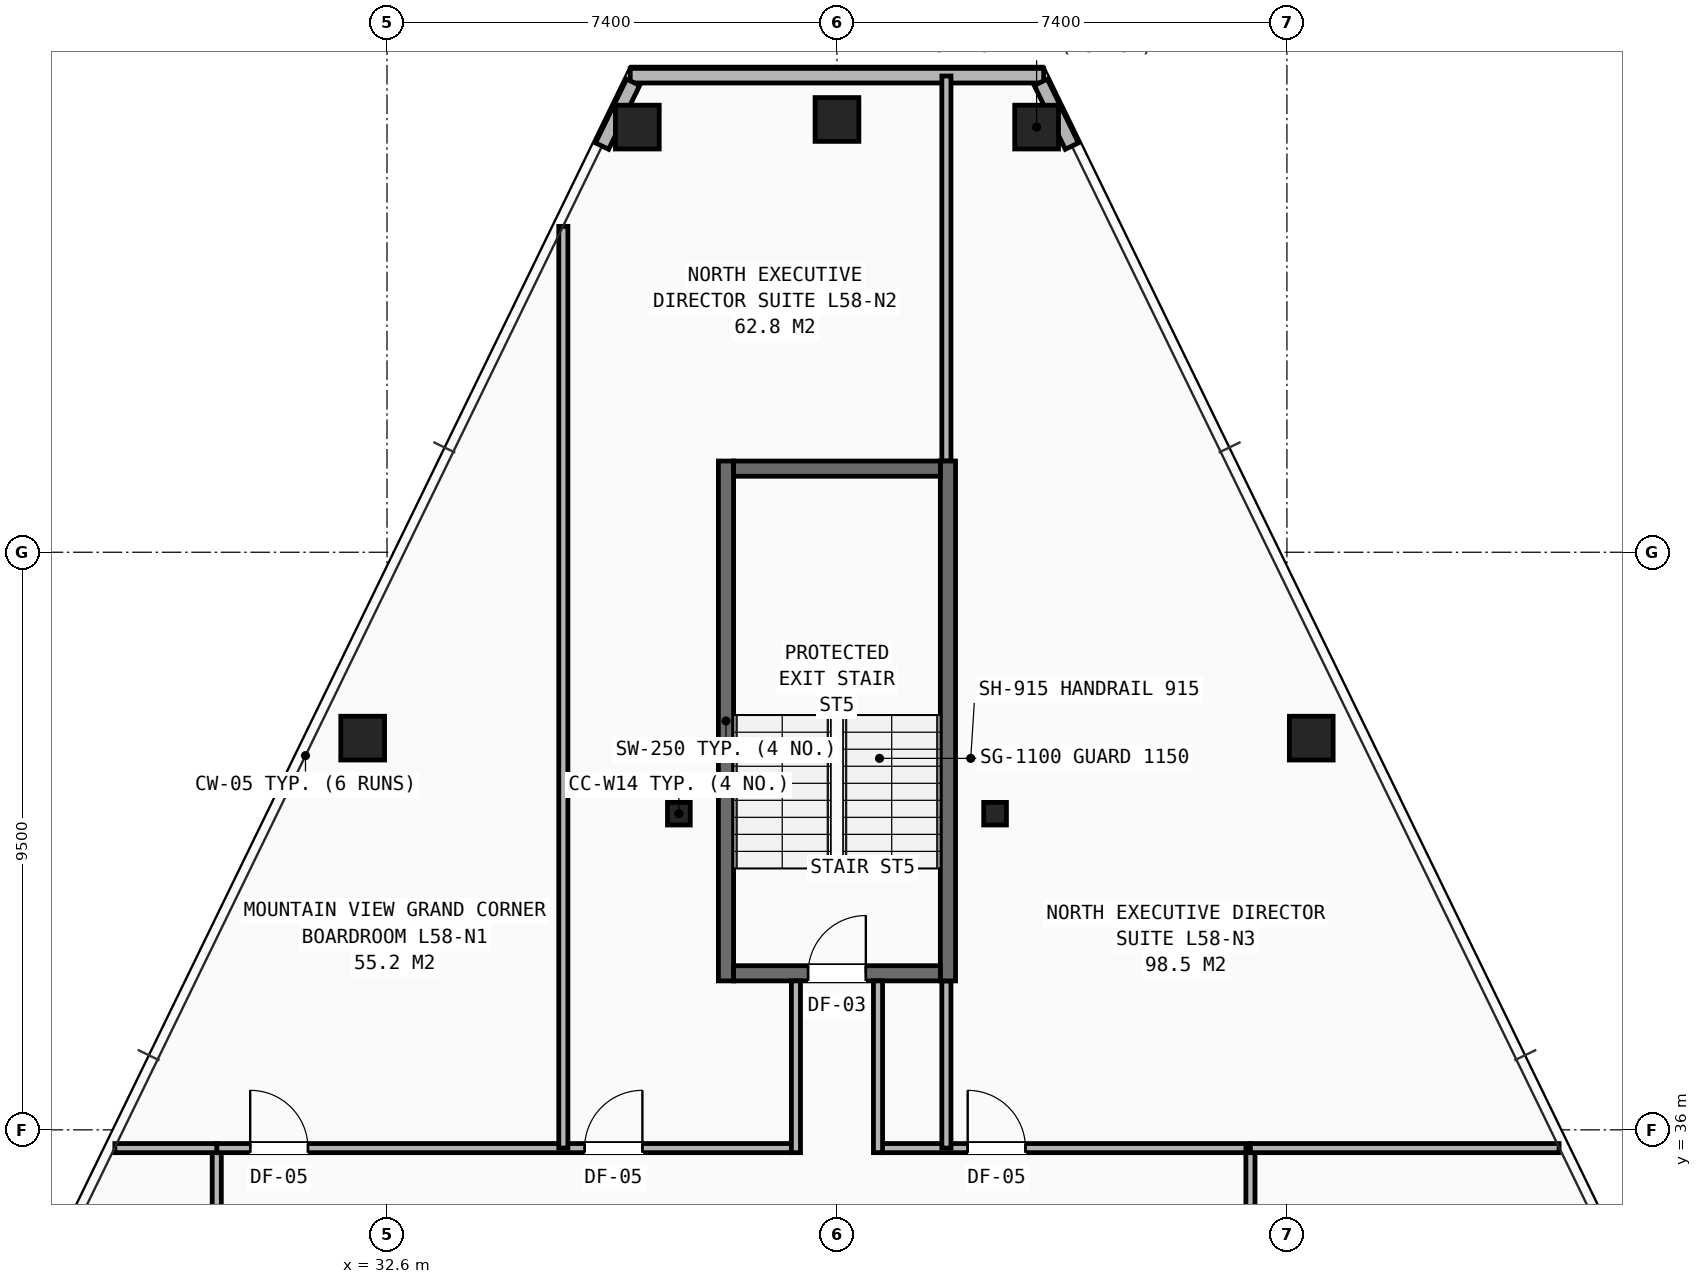
"""IFC4 building model, lengths in metres.
Left out: names, types, materials, properties, quantities, classifications, styles, units other than length and angle.
Written with IfcOpenShell. Run it as: python <this file> out.ifc"""

import sys

from ifc_helpers import new_model, si_unit, direction, frame, frame_2d, origin, origin_2d, place, context, subcontext, project, spatial, rectangle, hollow_rectangle, i_section, extrude, element, fill, save


model = new_model("IFC4")
c1 = context("Model", 3, precision=1e-05, world=origin(), true_north=direction((0.0, 1.0)))
c2 = subcontext(c1, "Body", "Model", "MODEL_VIEW")
j1 = project(units=[si_unit("LENGTHUNIT", "METRE"), si_unit("PLANEANGLEUNIT", "RADIAN")], contexts=[c1])
p1 = place(None, origin())
s1 = spatial("IfcSite", under=j1, at=p1, CompositionType="ELEMENT")
p2 = place(p1, origin())
s2 = spatial("IfcBuilding", under=s1, at=p2, CompositionType="ELEMENT")
p3 = place(p2, frame((0.0, 0.0, 204.9)))
s3 = spatial("IfcBuildingStorey", under=s2, at=p3, CompositionType="ELEMENT", Elevation=204.9)
for number, where, z_axis, x_axis in (
    (1, (37.4, 41.2, 0.0), (0.0, 0.0, 1.0), (1.0, 0.0, 0.0)),
    (2, (42.6, 41.2, 0.0), (0.0, 0.0, 1.0), (1.0, 0.0, 0.0)),
):
    element("IfcColumn", number, at=place(p3, frame(where, z_axis=z_axis, x_axis=x_axis)), inside=s3, PredefinedType="COLUMN", context=c2, shape_type="SweptSolid", body=[
        extrude(i_section(OverallWidth=0.374, OverallDepth=0.372, WebThickness=0.016, FlangeThickness=0.026, at=origin_2d()), origin(), (0.0, 0.0, 1.0), 3.5),
    ])
for number, where, z_axis, x_axis in (
    (3, (43.283, 52.492, 0.0), (0.0, 0.0, 1.0), (1.0, 0.0, 0.0)),
    (4, (40.0, 52.618, 0.0), (0.0, 0.0, 1.0), (1.0, 0.0, 0.0)),
    (5, (36.717, 52.492, 0.0), (0.0, 0.0, 1.0), (1.0, 0.0, 0.0)),
    (6, (32.2, 42.443, 0.0), (0.0, 0.0, 1.0), (1.0, 0.0, 0.0)),
    (7, (47.8, 42.443, 0.0), (0.0, 0.0, 1.0), (1.0, 0.0, 0.0)),
):
    element("IfcColumn", number, at=place(p3, frame(where, z_axis=z_axis, x_axis=x_axis)), inside=s3, PredefinedType="COLUMN", context=c2, shape_type="SweptSolid", body=[
        extrude(hollow_rectangle(XDim=0.72, YDim=0.72, WallThickness=0.05, at=origin_2d()), origin(), (0.0, 0.0, 1.0), 3.5),
    ])
p4 = place(p3, frame((36.6, 53.338, 0.0), z_axis=(0.0, 0.0, 1.0), x_axis=(1.0, 0.0, 0.0)))
e8 = element("IfcWall", 8, at=p4, inside=s3, PredefinedType="SHEAR", context=c2, shape_type="SweptSolid", body=[
    extrude(rectangle(XDim=6.8, YDim=0.24, at=frame_2d((3.4, 0.0))), origin(), (0.0, 0.0, 1.0), 2.623),
])
for number, where, z_axis, x_axis in (
    (9, (36.648, 53.23, 0.0), (0.0, 0.0, 1.0), (-0.438, -0.899, 0.0)),
    (10, (43.863, 52.18, 0.0), (0.0, 0.0, 1.0), (-0.438, 0.899, 0.0)),
):
    element("IfcWall", number, at=place(p3, frame(where, z_axis=z_axis, x_axis=x_axis)), inside=s3, PredefinedType="SHEAR", context=c2, shape_type="SweptSolid", body=[
        extrude(rectangle(XDim=1.168, YDim=0.24, at=frame_2d((0.584, 0.0))), origin(), (0.0, 0.0, 1.0), 2.623),
    ])
p5 = place(p3, frame((29.8, 16.4, 0.0), z_axis=(0.0, 0.0, 1.0), x_axis=(0.0, 1.0, 0.0)))
e11 = element("IfcWall", 11, at=p5, inside=s3, PredefinedType="PARTITIONING", context=c2, shape_type="SweptSolid", body=[
    extrude(rectangle(XDim=19.3, YDim=0.15, at=frame_2d((9.65, 0.0))), origin(), (0.0, 0.0, 1.0), 2.292),
])
p6 = place(p5, frame((0.35, 0.0, 0.0)))
e12 = element("IfcOpeningElement", 12, at=p6, cuts=e11, PredefinedType="OPENING", context=c2, shape_type="SweptSolid", body=[
    extrude(rectangle(XDim=0.95, YDim=2.1, at=frame_2d((0.475, 1.05))), frame((0.0, 0.085, 0.0), z_axis=(0.0, -1.0, 0.0), x_axis=(1.0, 0.0, 0.0)), (0.0, 0.0, 1.0), 0.17),
])
p7 = place(p5, frame((4.45, 0.0, 0.0)))
e13 = element("IfcOpeningElement", 13, at=p7, cuts=e11, PredefinedType="OPENING", context=c2, shape_type="SweptSolid", body=[
    extrude(rectangle(XDim=0.95, YDim=2.1, at=frame_2d((0.475, 1.05))), frame((0.0, 0.085, 0.0), z_axis=(0.0, -1.0, 0.0), x_axis=(1.0, 0.0, 0.0)), (0.0, 0.0, 1.0), 0.17),
])
p8 = place(p5, frame((9.45, 0.0, 0.0)))
e14 = element("IfcOpeningElement", 14, at=p8, cuts=e11, PredefinedType="OPENING", context=c2, shape_type="SweptSolid", body=[
    extrude(rectangle(XDim=0.95, YDim=2.1, at=frame_2d((0.475, 1.05))), frame((0.0, 0.085, 0.0), z_axis=(0.0, -1.0, 0.0), x_axis=(1.0, 0.0, 0.0)), (0.0, 0.0, 1.0), 0.17),
])
p9 = place(p5, frame((14.75, 0.0, 0.0)))
e15 = element("IfcOpeningElement", 15, at=p9, cuts=e11, PredefinedType="OPENING", context=c2, shape_type="SweptSolid", body=[
    extrude(rectangle(XDim=0.95, YDim=2.1, at=frame_2d((0.475, 1.05))), frame((0.0, 0.085, 0.0), z_axis=(0.0, -1.0, 0.0), x_axis=(1.0, 0.0, 0.0)), (0.0, 0.0, 1.0), 0.17),
])
p10 = place(p3, frame((29.8, 35.7, 0.0), z_axis=(0.0, 0.0, 1.0), x_axis=(1.0, 0.0, 0.0)))
e16 = element("IfcWall", 16, at=p10, inside=s3, PredefinedType="PARTITIONING", context=c2, shape_type="SweptSolid", body=[
    extrude(rectangle(XDim=9.45, YDim=0.15, at=frame_2d((4.725, 0.0))), origin(), (0.0, 0.0, 1.0), 2.833),
])
p11 = place(p10, frame((0.55, 0.0, 0.0)))
e17 = element("IfcOpeningElement", 17, at=p11, cuts=e16, PredefinedType="OPENING", context=c2, shape_type="SweptSolid", body=[
    extrude(rectangle(XDim=0.95, YDim=2.1, at=frame_2d((0.475, 1.05))), frame((0.0, 0.085, 0.0), z_axis=(0.0, -1.0, 0.0), x_axis=(1.0, 0.0, 0.0)), (0.0, 0.0, 1.0), 0.17),
])
p12 = place(p10, frame((6.05, 0.0, 0.0)))
e18 = element("IfcOpeningElement", 18, at=p12, cuts=e16, PredefinedType="OPENING", context=c2, shape_type="SweptSolid", body=[
    extrude(rectangle(XDim=0.95, YDim=2.1, at=frame_2d((0.475, 1.05))), frame((0.0, 0.085, 0.0), z_axis=(0.0, -1.0, 0.0), x_axis=(1.0, 0.0, 0.0)), (0.0, 0.0, 1.0), 0.17),
])
p13 = place(p3, frame((40.75, 35.7, 0.0), z_axis=(0.0, 0.0, 1.0), x_axis=(1.0, 0.0, 0.0)))
e19 = element("IfcWall", 19, at=p13, inside=s3, PredefinedType="PARTITIONING", context=c2, shape_type="SweptSolid", body=[
    extrude(rectangle(XDim=6.05, YDim=0.15, at=frame_2d((3.025, 0.0))), origin(), (0.0, 0.0, 1.0), 3.25),
])
p14 = place(p13, frame((1.4, 0.0, 0.0)))
e20 = element("IfcOpeningElement", 20, at=p14, cuts=e19, PredefinedType="OPENING", context=c2, shape_type="SweptSolid", body=[
    extrude(rectangle(XDim=0.95, YDim=2.1, at=frame_2d((0.475, 1.05))), frame((0.0, 0.085, 0.0), z_axis=(0.0, -1.0, 0.0), x_axis=(1.0, 0.0, 0.0)), (0.0, 0.0, 1.0), 0.17),
])
p15 = place(p3, frame((46.8, 31.2, 0.0), z_axis=(0.0, 0.0, 1.0), x_axis=(0.0, 1.0, 0.0)))
e21 = element("IfcWall", 21, at=p15, inside=s3, PredefinedType="PARTITIONING", context=c2, shape_type="SweptSolid", body=[
    extrude(rectangle(XDim=4.5, YDim=0.15, at=frame_2d((2.25, 0.0))), origin(), (0.0, 0.0, 1.0), 2.705),
])
p16 = place(p3, frame((28.124, 35.7, 0.0), z_axis=(0.0, 0.0, 1.0), x_axis=(1.0, 0.0, 0.0)))
e22 = element("IfcWall", 22, at=p16, inside=s3, PredefinedType="PARTITIONING", context=c2, shape_type="SweptSolid", body=[
    extrude(rectangle(XDim=1.676, YDim=0.15, at=frame_2d((0.838, 0.0))), origin(), (0.0, 0.0, 1.0), 2.628),
])
p17 = place(p3, frame((46.8, 35.7, 0.0), z_axis=(0.0, 0.0, 1.0), x_axis=(1.0, 0.0, 0.0)))
e23 = element("IfcWall", 23, at=p17, inside=s3, PredefinedType="PARTITIONING", context=c2, shape_type="SweptSolid", body=[
    extrude(rectangle(XDim=5.076, YDim=0.15, at=frame_2d((2.538, 0.0))), origin(), (0.0, 0.0, 1.0), 2.628),
])
p18 = place(p3, frame((35.5, 35.7, 0.0), z_axis=(0.0, 0.0, 1.0), x_axis=(0.0, 1.0, 0.0)))
e24 = element("IfcWall", 24, at=p18, inside=s3, PredefinedType="PARTITIONING", context=c2, shape_type="SweptSolid", body=[
    extrude(rectangle(XDim=15.16, YDim=0.15, at=frame_2d((7.58, 0.0))), origin(), (0.0, 0.0, 1.0), 2.292),
])
p19 = place(p3, frame((41.8, 35.7, 0.0), z_axis=(0.0, 0.0, 1.0), x_axis=(0.0, 1.0, 0.0)))
e25 = element("IfcWall", 25, at=p19, inside=s3, PredefinedType="PARTITIONING", context=c2, shape_type="SweptSolid", body=[
    extrude(rectangle(XDim=2.75, YDim=0.15, at=frame_2d((1.375, 0.0))), origin(), (0.0, 0.0, 1.0), 3.25),
])
p20 = place(p3, frame((41.8, 47.0, 0.0), z_axis=(0.0, 0.0, 1.0), x_axis=(0.0, 1.0, 0.0)))
e26 = element("IfcWall", 26, at=p20, inside=s3, PredefinedType="PARTITIONING", context=c2, shape_type="SweptSolid", body=[
    extrude(rectangle(XDim=6.333, YDim=0.15, at=frame_2d((3.167, 0.0))), origin(), (0.0, 0.0, 1.0), 2.628),
])
for number, where, z_axis, x_axis in (
    (27, (38.175, 38.45, 0.0), (0.0, 0.0, 1.0), (0.0, 1.0, 0.0)),
    (28, (41.825, 38.45, 0.0), (0.0, 0.0, 1.0), (0.0, 1.0, 0.0)),
):
    element("IfcWall", number, at=place(p3, frame(where, z_axis=z_axis, x_axis=x_axis)), inside=s3, PredefinedType="SHEAR", context=c2, shape_type="SweptSolid", body=[
        extrude(rectangle(XDim=8.55, YDim=0.25, at=frame_2d((4.275, 0.0))), origin(), (0.0, 0.0, 1.0), 3.25),
    ])
p21 = place(p3, frame((38.3, 38.575, 0.0), z_axis=(0.0, 0.0, 1.0), x_axis=(1.0, 0.0, 0.0)))
e29 = element("IfcWall", 29, at=p21, inside=s3, PredefinedType="SHEAR", context=c2, shape_type="SweptSolid", body=[
    extrude(rectangle(XDim=3.4, YDim=0.25, at=frame_2d((1.7, 0.0))), origin(), (0.0, 0.0, 1.0), 3.25),
])
p22 = place(p21, frame((1.225, 0.0, 0.0)))
e30 = element("IfcOpeningElement", 30, at=p22, cuts=e29, PredefinedType="OPENING", context=c2, shape_type="SweptSolid", body=[
    extrude(rectangle(XDim=0.95, YDim=2.1, at=frame_2d((0.475, 1.05))), frame((0.0, 0.135, 0.0), z_axis=(0.0, -1.0, 0.0), x_axis=(1.0, 0.0, 0.0)), (0.0, 0.0, 1.0), 0.27),
])
p23 = place(p3, frame((38.3, 46.875, 0.0), z_axis=(0.0, 0.0, 1.0), x_axis=(1.0, 0.0, 0.0)))
e31 = element("IfcWall", 31, at=p23, inside=s3, PredefinedType="SHEAR", context=c2, shape_type="SweptSolid", body=[
    extrude(rectangle(XDim=3.4, YDim=0.25, at=frame_2d((1.7, 0.0))), origin(), (0.0, 0.0, 1.0), 3.25),
])
for number, where, z_axis, x_axis in (
    (32, (39.325, 35.625, 0.0), (0.0, 0.0, 1.0), (0.0, 1.0, 0.0)),
    (33, (40.675, 35.625, 0.0), (0.0, 0.0, 1.0), (0.0, 1.0, 0.0)),
):
    element("IfcWall", number, at=place(p3, frame(where, z_axis=z_axis, x_axis=x_axis)), inside=s3, PredefinedType="PARTITIONING", context=c2, shape_type="SweptSolid", body=[
        extrude(rectangle(XDim=2.825, YDim=0.15, at=frame_2d((1.413, 0.0))), origin(), (0.0, 0.0, 1.0), 3.25),
    ])
p24 = place(p11, origin())
e34 = element("IfcDoor", 34, at=p24, inside=s3, OperationType="SINGLE_SWING_LEFT", PredefinedType="DOOR", context=c2, shape_type="SweptSolid", body=[
    extrude(rectangle(XDim=0.95, YDim=2.1, at=frame_2d((0.475, 1.05))), frame((0.0, 0.025, 0.0), z_axis=(0.0, -1.0, 0.0), x_axis=(1.0, 0.0, 0.0)), (0.0, 0.0, 1.0), 0.05),
])
fill(e17, e34)
p25 = place(p12, origin())
e35 = element("IfcDoor", 35, at=p25, inside=s3, OperationType="SINGLE_SWING_RIGHT", PredefinedType="DOOR", context=c2, shape_type="SweptSolid", body=[
    extrude(rectangle(XDim=0.95, YDim=2.1, at=frame_2d((0.475, 1.05))), frame((0.0, 0.025, 0.0), z_axis=(0.0, -1.0, 0.0), x_axis=(1.0, 0.0, 0.0)), (0.0, 0.0, 1.0), 0.05),
])
fill(e18, e35)
p26 = place(p14, origin())
e36 = element("IfcDoor", 36, at=p26, inside=s3, OperationType="SINGLE_SWING_LEFT", PredefinedType="DOOR", context=c2, shape_type="SweptSolid", body=[
    extrude(rectangle(XDim=0.95, YDim=2.1, at=frame_2d((0.475, 1.05))), frame((0.0, 0.025, 0.0), z_axis=(0.0, -1.0, 0.0), x_axis=(1.0, 0.0, 0.0)), (0.0, 0.0, 1.0), 0.05),
])
fill(e20, e36)
p27 = place(p22, origin())
e37 = element("IfcDoor", 37, at=p27, inside=s3, OperationType="SINGLE_SWING_RIGHT", PredefinedType="DOOR", context=c2, shape_type="SweptSolid", body=[
    extrude(rectangle(XDim=0.95, YDim=2.1, at=frame_2d((0.475, 1.05))), frame((0.0, 0.025, 0.0), z_axis=(0.0, -1.0, 0.0), x_axis=(1.0, 0.0, 0.0)), (0.0, 0.0, 1.0), 0.05),
])
fill(e30, e37)
save(model, sys.argv[1])
